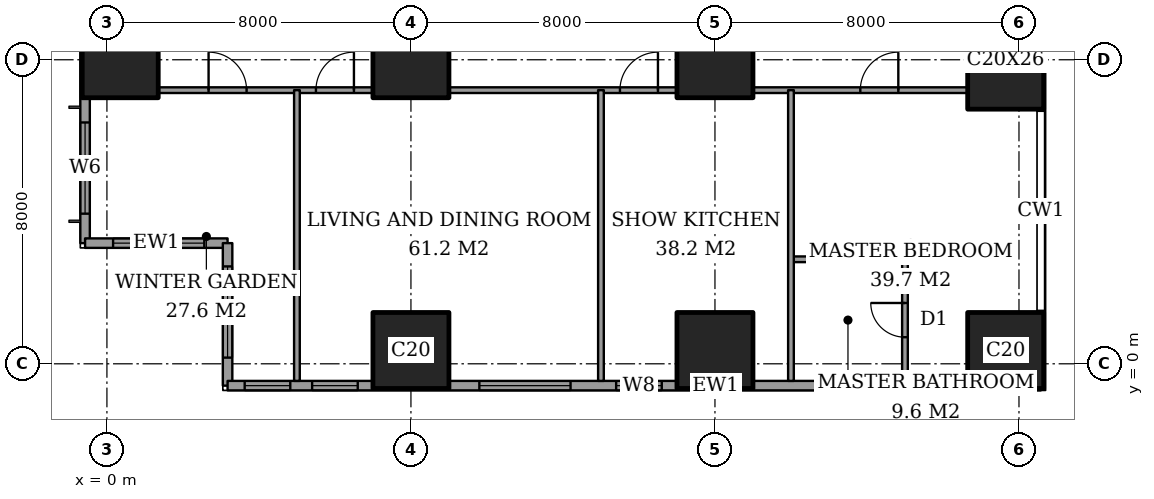
"""IFC4 building model, lengths in metres.
Left out: names, types, materials, properties, quantities, classifications, styles, units other than length and angle.
Written with IfcOpenShell. Run it as: python <this file> out.ifc"""

import sys

from ifc_helpers import new_model, si_unit, direction, frame, frame_2d, origin, origin_2d, place, context, subcontext, project, spatial, rectangle, extrude, element, fill, save


model = new_model("IFC4")
c1 = context("Model", 3, precision=1e-05, world=origin(), true_north=direction((0.0, 1.0)))
c2 = subcontext(c1, "Body", "Model", "MODEL_VIEW")
j1 = project(units=[si_unit("LENGTHUNIT", "METRE"), si_unit("PLANEANGLEUNIT", "RADIAN")], contexts=[c1])
p1 = place(None, origin())
s1 = spatial("IfcSite", under=j1, at=p1, CompositionType="ELEMENT")
p2 = place(p1, origin())
s2 = spatial("IfcBuilding", under=s1, at=p2, CompositionType="ELEMENT")
p3 = place(p2, frame((0.0, 0.0, 65.6)))
s3 = spatial("IfcBuildingStorey", under=s2, at=p3, CompositionType="ELEMENT", Elevation=65.6)
for number, where, z_axis, x_axis in (
    (1, (0.35, 8.0, 0.0), (0.0, 0.0, 1.0), (1.0, 0.0, 0.0)),
    (2, (8.0, 0.35, 0.0), (0.0, 0.0, 1.0), (1.0, 0.0, 0.0)),
    (3, (8.0, 8.0, 0.0), (0.0, 0.0, 1.0), (1.0, 0.0, 0.0)),
    (4, (16.0, 0.35, 0.0), (0.0, 0.0, 1.0), (1.0, 0.0, 0.0)),
    (5, (16.0, 8.0, 0.0), (0.0, 0.0, 1.0), (1.0, 0.0, 0.0)),
    (6, (23.65, 0.35, 0.0), (0.0, 0.0, 1.0), (1.0, 0.0, 0.0)),
):
    element("IfcColumn", number, at=place(p3, frame(where, z_axis=z_axis, x_axis=x_axis)), inside=s3, PredefinedType="COLUMN", context=c2, shape_type="SweptSolid", body=[
        extrude(rectangle(XDim=2.0, YDim=2.0, at=origin_2d()), origin(), (0.0, 0.0, 1.0), 3.6),
    ])
p4 = place(p3, frame((23.65, 8.0, 0.0), z_axis=(0.0, 0.0, 1.0), x_axis=(1.0, 0.0, 0.0)))
e7 = element("IfcColumn", 7, at=p4, inside=s3, PredefinedType="COLUMN", context=c2, shape_type="SweptSolid", body=[
    extrude(rectangle(XDim=2.0, YDim=2.6, at=origin_2d()), origin(), (0.0, 0.0, 1.0), 3.6),
])
p5 = place(p3, frame((-0.575, 44.825, 0.0), z_axis=(0.0, 0.0, 1.0), x_axis=(0.0, -1.0, 0.0)))
e8 = element("IfcWall", 8, at=p5, inside=s3, PredefinedType="SOLIDWALL", context=c2, shape_type="SweptSolid", body=[
    extrude(rectangle(XDim=41.65, YDim=0.25, at=frame_2d((20.825, 0.0))), origin(), (0.0, 0.0, 1.0), 3.6),
])
p6 = place(p5, frame((0.775, 0.0, 0.6)))
e9 = element("IfcOpeningElement", 9, at=p6, cuts=e8, PredefinedType="OPENING", context=c2, shape_type="SweptSolid", body=[
    extrude(rectangle(XDim=2.4, YDim=2.0, at=frame_2d((1.2, 1.0))), frame((0.0, 0.135, 0.0), z_axis=(0.0, -1.0, 0.0), x_axis=(1.0, 0.0, 0.0)), (0.0, 0.0, 1.0), 0.27),
])
p7 = place(p5, frame((6.1, 0.0, 0.6)))
e10 = element("IfcOpeningElement", 10, at=p7, cuts=e8, PredefinedType="OPENING", context=c2, shape_type="SweptSolid", body=[
    extrude(rectangle(XDim=1.2, YDim=2.0, at=frame_2d((0.6, 1.0))), frame((0.0, 0.135, 0.0), z_axis=(0.0, -1.0, 0.0), x_axis=(1.0, 0.0, 0.0)), (0.0, 0.0, 1.0), 0.27),
])
p8 = place(p5, frame((8.425, 0.0, 0.6)))
e11 = element("IfcOpeningElement", 11, at=p8, cuts=e8, PredefinedType="OPENING", context=c2, shape_type="SweptSolid", body=[
    extrude(rectangle(XDim=2.4, YDim=2.0, at=frame_2d((1.2, 1.0))), frame((0.0, 0.135, 0.0), z_axis=(0.0, -1.0, 0.0), x_axis=(1.0, 0.0, 0.0)), (0.0, 0.0, 1.0), 0.27),
])
p9 = place(p5, frame((15.625, 0.0, 0.6)))
e12 = element("IfcOpeningElement", 12, at=p9, cuts=e8, PredefinedType="OPENING", context=c2, shape_type="SweptSolid", body=[
    extrude(rectangle(XDim=2.4, YDim=2.0, at=frame_2d((1.2, 1.0))), frame((0.0, 0.135, 0.0), z_axis=(0.0, -1.0, 0.0), x_axis=(1.0, 0.0, 0.0)), (0.0, 0.0, 1.0), 0.27),
])
p10 = place(p5, frame((23.625, 0.0, 0.6)))
e13 = element("IfcOpeningElement", 13, at=p10, cuts=e8, PredefinedType="OPENING", context=c2, shape_type="SweptSolid", body=[
    extrude(rectangle(XDim=2.4, YDim=2.0, at=frame_2d((1.2, 1.0))), frame((0.0, 0.135, 0.0), z_axis=(0.0, -1.0, 0.0), x_axis=(1.0, 0.0, 0.0)), (0.0, 0.0, 1.0), 0.27),
])
p11 = place(p5, frame((30.825, 0.0, 0.6)))
e14 = element("IfcOpeningElement", 14, at=p11, cuts=e8, PredefinedType="OPENING", context=c2, shape_type="SweptSolid", body=[
    extrude(rectangle(XDim=2.4, YDim=2.0, at=frame_2d((1.2, 1.0))), frame((0.0, 0.135, 0.0), z_axis=(0.0, -1.0, 0.0), x_axis=(1.0, 0.0, 0.0)), (0.0, 0.0, 1.0), 0.27),
])
p12 = place(p5, frame((34.5, 0.0, 0.6)))
e15 = element("IfcOpeningElement", 15, at=p12, cuts=e8, PredefinedType="OPENING", context=c2, shape_type="SweptSolid", body=[
    extrude(rectangle(XDim=1.2, YDim=2.0, at=frame_2d((0.6, 1.0))), frame((0.0, 0.135, 0.0), z_axis=(0.0, -1.0, 0.0), x_axis=(1.0, 0.0, 0.0)), (0.0, 0.0, 1.0), 0.27),
])
p13 = place(p5, frame((38.475, 0.0, 0.6)))
e16 = element("IfcOpeningElement", 16, at=p13, cuts=e8, PredefinedType="OPENING", context=c2, shape_type="SweptSolid", body=[
    extrude(rectangle(XDim=2.4, YDim=2.0, at=frame_2d((1.2, 1.0))), frame((0.0, 0.135, 0.0), z_axis=(0.0, -1.0, 0.0), x_axis=(1.0, 0.0, 0.0)), (0.0, 0.0, 1.0), 0.27),
])
p14 = place(p3, frame((-0.575, 3.175, 0.0), z_axis=(0.0, 0.0, 1.0), x_axis=(1.0, 0.0, 0.0)))
e17 = element("IfcWall", 17, at=p14, inside=s3, PredefinedType="SOLIDWALL", context=c2, shape_type="SweptSolid", body=[
    extrude(rectangle(XDim=3.75, YDim=0.25, at=frame_2d((1.875, 0.0))), origin(), (0.0, 0.0, 1.0), 3.6),
])
p15 = place(p14, frame((0.738, 0.0, 0.6)))
e18 = element("IfcOpeningElement", 18, at=p15, cuts=e17, PredefinedType="OPENING", context=c2, shape_type="SweptSolid", body=[
    extrude(rectangle(XDim=2.4, YDim=2.0, at=frame_2d((1.2, 1.0))), frame((0.0, 0.135, 0.0), z_axis=(0.0, -1.0, 0.0), x_axis=(1.0, 0.0, 0.0)), (0.0, 0.0, 1.0), 0.27),
])
p16 = place(p3, frame((3.175, 3.175, 0.0), z_axis=(0.0, 0.0, 1.0), x_axis=(0.0, -1.0, 0.0)))
e19 = element("IfcWall", 19, at=p16, inside=s3, PredefinedType="SOLIDWALL", context=c2, shape_type="SweptSolid", body=[
    extrude(rectangle(XDim=3.75, YDim=0.25, at=frame_2d((1.875, 0.0))), origin(), (0.0, 0.0, 1.0), 3.6),
])
p17 = place(p16, frame((0.613, 0.0, 0.6)))
e20 = element("IfcOpeningElement", 20, at=p17, cuts=e19, PredefinedType="OPENING", context=c2, shape_type="SweptSolid", body=[
    extrude(rectangle(XDim=2.4, YDim=2.0, at=frame_2d((1.2, 1.0))), frame((0.0, 0.135, 0.0), z_axis=(0.0, -1.0, 0.0), x_axis=(1.0, 0.0, 0.0)), (0.0, 0.0, 1.0), 0.27),
])
p18 = place(p3, frame((3.175, -0.575, 0.0), z_axis=(0.0, 0.0, 1.0), x_axis=(1.0, 0.0, 0.0)))
e21 = element("IfcWall", 21, at=p18, inside=s3, PredefinedType="SOLIDWALL", context=c2, shape_type="SweptSolid", body=[
    extrude(rectangle(XDim=21.4, YDim=0.25, at=frame_2d((10.7, 0.0))), origin(), (0.0, 0.0, 1.0), 3.6),
])
p19 = place(p18, frame((0.45, 0.0, 0.6)))
e22 = element("IfcOpeningElement", 22, at=p19, cuts=e21, PredefinedType="OPENING", context=c2, shape_type="SweptSolid", body=[
    extrude(rectangle(XDim=1.2, YDim=2.0, at=frame_2d((0.6, 1.0))), frame((0.0, 0.135, 0.0), z_axis=(0.0, -1.0, 0.0), x_axis=(1.0, 0.0, 0.0)), (0.0, 0.0, 1.0), 0.27),
])
p20 = place(p18, frame((2.225, 0.0, 0.6)))
e23 = element("IfcOpeningElement", 23, at=p20, cuts=e21, PredefinedType="OPENING", context=c2, shape_type="SweptSolid", body=[
    extrude(rectangle(XDim=1.2, YDim=2.0, at=frame_2d((0.6, 1.0))), frame((0.0, 0.135, 0.0), z_axis=(0.0, -1.0, 0.0), x_axis=(1.0, 0.0, 0.0)), (0.0, 0.0, 1.0), 0.27),
])
p21 = place(p18, frame((6.625, 0.0, 0.6)))
e24 = element("IfcOpeningElement", 24, at=p21, cuts=e21, PredefinedType="OPENING", context=c2, shape_type="SweptSolid", body=[
    extrude(rectangle(XDim=2.4, YDim=2.0, at=frame_2d((1.2, 1.0))), frame((0.0, 0.135, 0.0), z_axis=(0.0, -1.0, 0.0), x_axis=(1.0, 0.0, 0.0)), (0.0, 0.0, 1.0), 0.27),
])
p22 = place(p18, frame((10.225, 0.0, 0.6)))
e25 = element("IfcOpeningElement", 25, at=p22, cuts=e21, PredefinedType="OPENING", context=c2, shape_type="SweptSolid", body=[
    extrude(rectangle(XDim=1.2, YDim=2.0, at=frame_2d((0.6, 1.0))), frame((0.0, 0.135, 0.0), z_axis=(0.0, -1.0, 0.0), x_axis=(1.0, 0.0, 0.0)), (0.0, 0.0, 1.0), 0.27),
])
p23 = place(p18, frame((15.725, 0.0, 0.6)))
e26 = element("IfcOpeningElement", 26, at=p23, cuts=e21, PredefinedType="OPENING", context=c2, shape_type="SweptSolid", body=[
    extrude(rectangle(XDim=1.2, YDim=2.0, at=frame_2d((0.6, 1.0))), frame((0.0, 0.135, 0.0), z_axis=(0.0, -1.0, 0.0), x_axis=(1.0, 0.0, 0.0)), (0.0, 0.0, 1.0), 0.27),
])
p24 = place(p18, frame((18.125, 0.0, 0.6)))
e27 = element("IfcOpeningElement", 27, at=p24, cuts=e21, PredefinedType="OPENING", context=c2, shape_type="SweptSolid", body=[
    extrude(rectangle(XDim=1.2, YDim=2.0, at=frame_2d((0.6, 1.0))), frame((0.0, 0.135, 0.0), z_axis=(0.0, -1.0, 0.0), x_axis=(1.0, 0.0, 0.0)), (0.0, 0.0, 1.0), 0.27),
])
p25 = place(p3, frame((18.0, 2.75, 0.0), z_axis=(0.0, 0.0, 1.0), x_axis=(1.0, 0.0, 0.0)))
e28 = element("IfcWall", 28, at=p25, inside=s3, PredefinedType="PARTITIONING", context=c2, shape_type="SweptSolid", body=[
    extrude(rectangle(XDim=3.0, YDim=0.15, at=frame_2d((1.5, 0.0))), origin(), (0.0, 0.0, 1.0), 3.35),
])
p26 = place(p3, frame((1.35, 7.2, 0.0), z_axis=(0.0, 0.0, 1.0), x_axis=(1.0, 0.0, 0.0)))
e29 = element("IfcWall", 29, at=p26, inside=s3, PredefinedType="PARTITIONING", context=c2, shape_type="SweptSolid", body=[
    extrude(rectangle(XDim=5.65, YDim=0.15, at=frame_2d((2.825, 0.0))), origin(), (0.0, 0.0, 1.0), 3.35),
])
p27 = place(p26, frame((1.325, 0.0, 0.0)))
e30 = element("IfcOpeningElement", 30, at=p27, cuts=e29, PredefinedType="OPENING", context=c2, shape_type="SweptSolid", body=[
    extrude(rectangle(XDim=1.0, YDim=2.1, at=frame_2d((0.5, 1.05))), frame((0.0, 0.085, 0.0), z_axis=(0.0, -1.0, 0.0), x_axis=(1.0, 0.0, 0.0)), (0.0, 0.0, 1.0), 0.17),
])
p28 = place(p26, frame((4.15, 0.0, 0.0)))
e31 = element("IfcOpeningElement", 31, at=p28, cuts=e29, PredefinedType="OPENING", context=c2, shape_type="SweptSolid", body=[
    extrude(rectangle(XDim=1.0, YDim=2.1, at=frame_2d((0.5, 1.05))), frame((0.0, 0.085, 0.0), z_axis=(0.0, -1.0, 0.0), x_axis=(1.0, 0.0, 0.0)), (0.0, 0.0, 1.0), 0.17),
])
p29 = place(p3, frame((9.0, 7.2, 0.0), z_axis=(0.0, 0.0, 1.0), x_axis=(1.0, 0.0, 0.0)))
e32 = element("IfcWall", 32, at=p29, inside=s3, PredefinedType="PARTITIONING", context=c2, shape_type="SweptSolid", body=[
    extrude(rectangle(XDim=6.0, YDim=0.15, at=frame_2d((3.0, 0.0))), origin(), (0.0, 0.0, 1.0), 3.35),
])
p30 = place(p29, frame((4.5, 0.0, 0.0)))
e33 = element("IfcOpeningElement", 33, at=p30, cuts=e32, PredefinedType="OPENING", context=c2, shape_type="SweptSolid", body=[
    extrude(rectangle(XDim=1.0, YDim=2.1, at=frame_2d((0.5, 1.05))), frame((0.0, 0.085, 0.0), z_axis=(0.0, -1.0, 0.0), x_axis=(1.0, 0.0, 0.0)), (0.0, 0.0, 1.0), 0.17),
])
p31 = place(p3, frame((17.0, 7.2, 0.0), z_axis=(0.0, 0.0, 1.0), x_axis=(1.0, 0.0, 0.0)))
e34 = element("IfcWall", 34, at=p31, inside=s3, PredefinedType="PARTITIONING", context=c2, shape_type="SweptSolid", body=[
    extrude(rectangle(XDim=5.65, YDim=0.15, at=frame_2d((2.825, 0.0))), origin(), (0.0, 0.0, 1.0), 3.35),
])
p32 = place(p31, frame((2.825, 0.0, 0.0)))
e35 = element("IfcOpeningElement", 35, at=p32, cuts=e34, PredefinedType="OPENING", context=c2, shape_type="SweptSolid", body=[
    extrude(rectangle(XDim=1.0, YDim=2.1, at=frame_2d((0.5, 1.05))), frame((0.0, 0.085, 0.0), z_axis=(0.0, -1.0, 0.0), x_axis=(1.0, 0.0, 0.0)), (0.0, 0.0, 1.0), 0.17),
])
for number, where, z_axis, x_axis in (
    (36, (5.0, -0.45, 0.0), (0.0, 0.0, 1.0), (0.0, 1.0, 0.0)),
    (37, (13.0, -0.45, 0.0), (0.0, 0.0, 1.0), (0.0, 1.0, 0.0)),
    (38, (18.0, -0.45, 0.0), (0.0, 0.0, 1.0), (0.0, 1.0, 0.0)),
):
    element("IfcWall", number, at=place(p3, frame(where, z_axis=z_axis, x_axis=x_axis)), inside=s3, PredefinedType="PARTITIONING", context=c2, shape_type="SweptSolid", body=[
        extrude(rectangle(XDim=7.65, YDim=0.15, at=frame_2d((3.825, 0.0))), origin(), (0.0, 0.0, 1.0), 3.35),
    ])
p33 = place(p3, frame((21.0, -0.45, 0.0), z_axis=(0.0, 0.0, 1.0), x_axis=(0.0, 1.0, 0.0)))
e39 = element("IfcWall", 39, at=p33, inside=s3, PredefinedType="PARTITIONING", context=c2, shape_type="SweptSolid", body=[
    extrude(rectangle(XDim=3.2, YDim=0.15, at=frame_2d((1.6, 0.0))), origin(), (0.0, 0.0, 1.0), 3.35),
])
p34 = place(p33, frame((1.15, 0.0, 0.0)))
e40 = element("IfcOpeningElement", 40, at=p34, cuts=e39, PredefinedType="OPENING", context=c2, shape_type="SweptSolid", body=[
    extrude(rectangle(XDim=0.9, YDim=2.1, at=frame_2d((0.45, 1.05))), frame((0.0, 0.085, 0.0), z_axis=(0.0, -1.0, 0.0), x_axis=(1.0, 0.0, 0.0)), (0.0, 0.0, 1.0), 0.17),
])
p35 = place(p13, origin())
e41 = element("IfcWindow", 41, at=p35, inside=s3, PartitioningType="SINGLE_PANEL", PredefinedType="WINDOW", context=c2, shape_type="SweptSolid", body=[
    extrude(rectangle(XDim=2.4, YDim=2.0, at=frame_2d((1.2, 1.0))), frame((0.0, 0.03, 0.0), z_axis=(0.0, -1.0, 0.0), x_axis=(1.0, 0.0, 0.0)), (0.0, 0.0, 1.0), 0.06),
])
fill(e16, e41)
p36 = place(p15, origin())
e42 = element("IfcWindow", 42, at=p36, inside=s3, PartitioningType="SINGLE_PANEL", PredefinedType="WINDOW", context=c2, shape_type="SweptSolid", body=[
    extrude(rectangle(XDim=2.4, YDim=2.0, at=frame_2d((1.2, 1.0))), frame((0.0, 0.03, 0.0), z_axis=(0.0, -1.0, 0.0), x_axis=(1.0, 0.0, 0.0)), (0.0, 0.0, 1.0), 0.06),
])
fill(e18, e42)
p37 = place(p17, origin())
e43 = element("IfcWindow", 43, at=p37, inside=s3, PartitioningType="SINGLE_PANEL", PredefinedType="WINDOW", context=c2, shape_type="SweptSolid", body=[
    extrude(rectangle(XDim=2.4, YDim=2.0, at=frame_2d((1.2, 1.0))), frame((0.0, 0.03, 0.0), z_axis=(0.0, -1.0, 0.0), x_axis=(1.0, 0.0, 0.0)), (0.0, 0.0, 1.0), 0.06),
])
fill(e20, e43)
p38 = place(p19, origin())
e44 = element("IfcWindow", 44, at=p38, inside=s3, PartitioningType="SINGLE_PANEL", PredefinedType="WINDOW", context=c2, shape_type="SweptSolid", body=[
    extrude(rectangle(XDim=1.2, YDim=2.0, at=frame_2d((0.6, 1.0))), frame((0.0, 0.03, 0.0), z_axis=(0.0, -1.0, 0.0), x_axis=(1.0, 0.0, 0.0)), (0.0, 0.0, 1.0), 0.06),
])
fill(e22, e44)
p39 = place(p20, origin())
e45 = element("IfcWindow", 45, at=p39, inside=s3, PartitioningType="SINGLE_PANEL", PredefinedType="WINDOW", context=c2, shape_type="SweptSolid", body=[
    extrude(rectangle(XDim=1.2, YDim=2.0, at=frame_2d((0.6, 1.0))), frame((0.0, 0.03, 0.0), z_axis=(0.0, -1.0, 0.0), x_axis=(1.0, 0.0, 0.0)), (0.0, 0.0, 1.0), 0.06),
])
fill(e23, e45)
p40 = place(p21, origin())
e46 = element("IfcWindow", 46, at=p40, inside=s3, PartitioningType="SINGLE_PANEL", PredefinedType="WINDOW", context=c2, shape_type="SweptSolid", body=[
    extrude(rectangle(XDim=2.4, YDim=2.0, at=frame_2d((1.2, 1.0))), frame((0.0, 0.03, 0.0), z_axis=(0.0, -1.0, 0.0), x_axis=(1.0, 0.0, 0.0)), (0.0, 0.0, 1.0), 0.06),
])
fill(e24, e46)
p41 = place(p22, origin())
e47 = element("IfcWindow", 47, at=p41, inside=s3, PartitioningType="SINGLE_PANEL", PredefinedType="WINDOW", context=c2, shape_type="SweptSolid", body=[
    extrude(rectangle(XDim=1.2, YDim=2.0, at=frame_2d((0.6, 1.0))), frame((0.0, 0.03, 0.0), z_axis=(0.0, -1.0, 0.0), x_axis=(1.0, 0.0, 0.0)), (0.0, 0.0, 1.0), 0.06),
])
fill(e25, e47)
p42 = place(p23, origin())
e48 = element("IfcWindow", 48, at=p42, inside=s3, PartitioningType="SINGLE_PANEL", PredefinedType="WINDOW", context=c2, shape_type="SweptSolid", body=[
    extrude(rectangle(XDim=1.2, YDim=2.0, at=frame_2d((0.6, 1.0))), frame((0.0, 0.03, 0.0), z_axis=(0.0, -1.0, 0.0), x_axis=(1.0, 0.0, 0.0)), (0.0, 0.0, 1.0), 0.06),
])
fill(e26, e48)
p43 = place(p24, origin())
e49 = element("IfcWindow", 49, at=p43, inside=s3, PartitioningType="SINGLE_PANEL", PredefinedType="WINDOW", context=c2, shape_type="SweptSolid", body=[
    extrude(rectangle(XDim=1.2, YDim=2.0, at=frame_2d((0.6, 1.0))), frame((0.0, 0.03, 0.0), z_axis=(0.0, -1.0, 0.0), x_axis=(1.0, 0.0, 0.0)), (0.0, 0.0, 1.0), 0.06),
])
fill(e27, e49)
p44 = place(p27, origin())
e50 = element("IfcDoor", 50, at=p44, inside=s3, OperationType="SINGLE_SWING_RIGHT", PredefinedType="DOOR", context=c2, shape_type="SweptSolid", body=[
    extrude(rectangle(XDim=1.0, YDim=2.1, at=frame_2d((0.5, 1.05))), frame((0.0, 0.025, 0.0), z_axis=(0.0, -1.0, 0.0), x_axis=(1.0, 0.0, 0.0)), (0.0, 0.0, 1.0), 0.05),
])
fill(e30, e50)
p45 = place(p28, origin())
e51 = element("IfcDoor", 51, at=p45, inside=s3, OperationType="SINGLE_SWING_LEFT", PredefinedType="DOOR", context=c2, shape_type="SweptSolid", body=[
    extrude(rectangle(XDim=1.0, YDim=2.1, at=frame_2d((0.5, 1.05))), frame((0.0, 0.025, 0.0), z_axis=(0.0, -1.0, 0.0), x_axis=(1.0, 0.0, 0.0)), (0.0, 0.0, 1.0), 0.05),
])
fill(e31, e51)
p46 = place(p30, origin())
e52 = element("IfcDoor", 52, at=p46, inside=s3, OperationType="SINGLE_SWING_LEFT", PredefinedType="DOOR", context=c2, shape_type="SweptSolid", body=[
    extrude(rectangle(XDim=1.0, YDim=2.1, at=frame_2d((0.5, 1.05))), frame((0.0, 0.025, 0.0), z_axis=(0.0, -1.0, 0.0), x_axis=(1.0, 0.0, 0.0)), (0.0, 0.0, 1.0), 0.05),
])
fill(e33, e52)
p47 = place(p34, origin())
e53 = element("IfcDoor", 53, at=p47, inside=s3, OperationType="SINGLE_SWING_LEFT", PredefinedType="DOOR", context=c2, shape_type="SweptSolid", body=[
    extrude(rectangle(XDim=0.9, YDim=2.1, at=frame_2d((0.45, 1.05))), frame((0.0, 0.025, 0.0), z_axis=(0.0, -1.0, 0.0), x_axis=(1.0, 0.0, 0.0)), (0.0, 0.0, 1.0), 0.05),
])
fill(e40, e53)
p48 = place(p32, origin())
e54 = element("IfcDoor", 54, at=p48, inside=s3, OperationType="SINGLE_SWING_LEFT", PredefinedType="DOOR", context=c2, shape_type="SweptSolid", body=[
    extrude(rectangle(XDim=1.0, YDim=2.1, at=frame_2d((0.5, 1.05))), frame((0.0, 0.025, 0.0), z_axis=(0.0, -1.0, 0.0), x_axis=(1.0, 0.0, 0.0)), (0.0, 0.0, 1.0), 0.05),
])
fill(e35, e54)
save(model, sys.argv[1])
